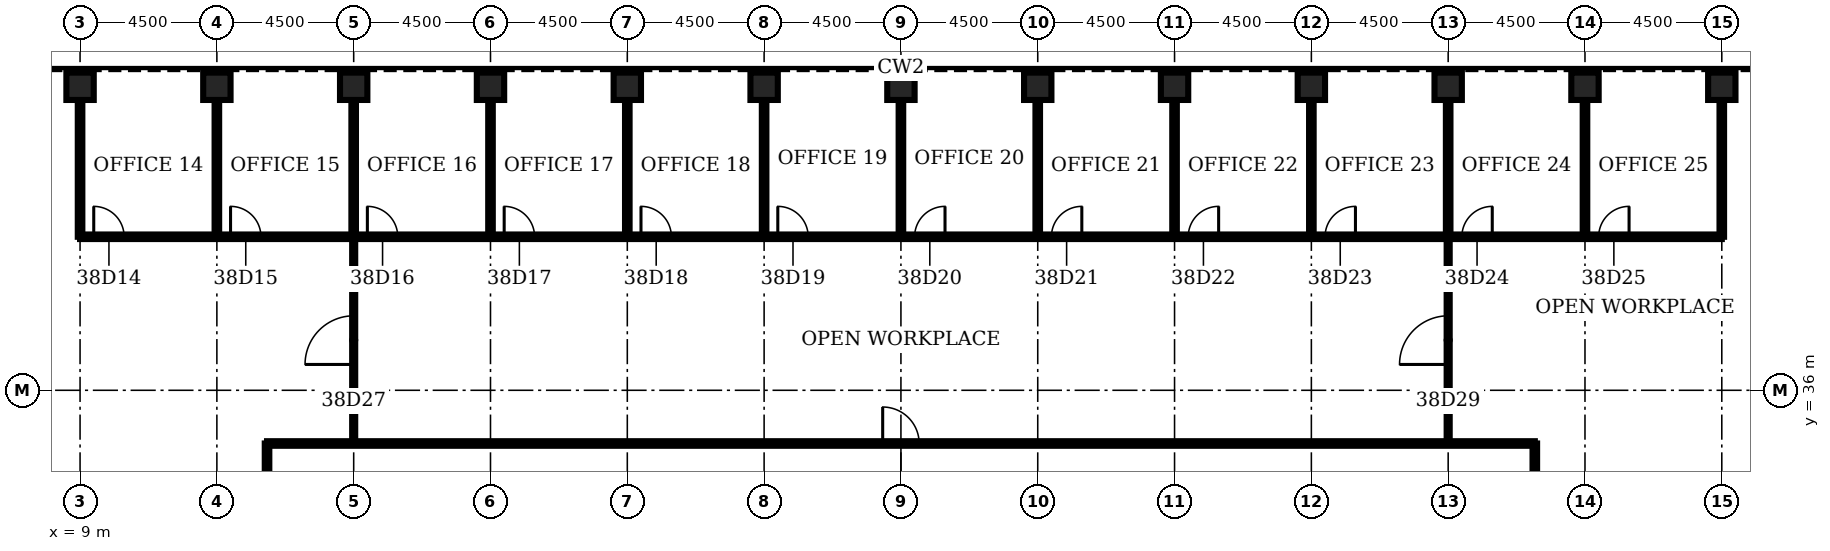
"""IFC4 building model, lengths in metres.
Left out: names, types, materials, properties, quantities, classifications, styles, units other than length and angle.
Written with IfcOpenShell. Run it as: python <this file> out.ifc"""

import sys

from ifc_helpers import new_model, si_unit, direction, frame, frame_2d, origin, origin_2d, place, context, subcontext, project, spatial, rectangle, hollow_rectangle, extrude, element, fill, save


model = new_model("IFC4")
c1 = context("Model", 3, precision=1e-05, world=origin(), true_north=direction((0.0, 1.0)))
c2 = subcontext(c1, "Body", "Model", "MODEL_VIEW")
j1 = project(units=[si_unit("LENGTHUNIT", "METRE"), si_unit("PLANEANGLEUNIT", "RADIAN")], contexts=[c1])
p1 = place(None, origin())
s1 = spatial("IfcSite", under=j1, at=p1, CompositionType="ELEMENT")
p2 = place(p1, origin())
s2 = spatial("IfcBuilding", under=s1, at=p2, CompositionType="ELEMENT")
p3 = place(p2, frame((0.0, 0.0, 171.9)))
s3 = spatial("IfcBuildingStorey", under=s2, at=p3, CompositionType="ELEMENT", Elevation=171.9)
for number, where, z_axis, x_axis in (
    (1, (63.0, 46.0, 0.0), (0.0, 0.0, 1.0), (0.0, 1.0, 0.0)),
    (2, (58.5, 46.0, 0.0), (0.0, 0.0, 1.0), (0.0, 1.0, 0.0)),
    (3, (54.0, 46.0, 0.0), (0.0, 0.0, 1.0), (0.0, 1.0, 0.0)),
    (4, (49.5, 46.0, 0.0), (0.0, 0.0, 1.0), (0.0, 1.0, 0.0)),
    (5, (45.0, 46.0, 0.0), (0.0, 0.0, 1.0), (0.0, 1.0, 0.0)),
    (6, (40.5, 46.0, 0.0), (0.0, 0.0, 1.0), (0.0, 1.0, 0.0)),
    (7, (36.0, 46.0, 0.0), (0.0, 0.0, 1.0), (0.0, 1.0, 0.0)),
    (8, (31.5, 46.0, 0.0), (0.0, 0.0, 1.0), (0.0, 1.0, 0.0)),
    (9, (27.0, 46.0, 0.0), (0.0, 0.0, 1.0), (0.0, 1.0, 0.0)),
    (10, (22.5, 46.0, 0.0), (0.0, 0.0, 1.0), (0.0, 1.0, 0.0)),
    (11, (18.0, 46.0, 0.0), (0.0, 0.0, 1.0), (0.0, 1.0, 0.0)),
    (12, (13.5, 46.0, 0.0), (0.0, 0.0, 1.0), (0.0, 1.0, 0.0)),
    (13, (9.0, 46.0, 0.0), (0.0, 0.0, 1.0), (0.0, 1.0, 0.0)),
):
    element("IfcColumn", number, at=place(p3, frame(where, z_axis=z_axis, x_axis=x_axis)), inside=s3, PredefinedType="COLUMN", context=c2, shape_type="SweptSolid", body=[
        extrude(hollow_rectangle(XDim=0.9, YDim=0.9, WallThickness=0.09, at=origin_2d()), origin(), (0.0, 0.0, 1.0), 4.2),
    ])
p4 = place(p3, frame((15.15, 34.25, 0.0), z_axis=(0.0, 0.0, 1.0), x_axis=(1.0, 0.0, 0.0)))
e14 = element("IfcWall", 14, at=p4, inside=s3, PredefinedType="PARTITIONING", context=c2, shape_type="SweptSolid", body=[
    extrude(rectangle(XDim=41.7, YDim=0.15, at=frame_2d((20.85, 0.0))), origin(), (0.0, 0.0, 1.0), 3.0),
])
p5 = place(p4, frame((20.25, 0.0, 0.0)))
e15 = element("IfcOpeningElement", 15, at=p5, cuts=e14, PredefinedType="OPENING", context=c2, shape_type="SweptSolid", body=[
    extrude(rectangle(XDim=1.2, YDim=2.1, at=frame_2d((0.6, 1.05))), frame((0.0, 0.085, 0.0), z_axis=(0.0, -1.0, 0.0), x_axis=(1.0, 0.0, 0.0)), (0.0, 0.0, 1.0), 0.17),
])
p6 = place(p3, frame((9.0, 41.05, 0.0), z_axis=(0.0, 0.0, 1.0), x_axis=(1.0, 0.0, 0.0)))
e16 = element("IfcWall", 16, at=p6, inside=s3, PredefinedType="PARTITIONING", context=c2, shape_type="SweptSolid", body=[
    extrude(rectangle(XDim=54.0, YDim=0.15, at=frame_2d((27.0, 0.0))), origin(), (0.0, 0.0, 1.0), 3.0),
])
p7 = place(p6, frame((0.45, 0.0, 0.0)))
e17 = element("IfcOpeningElement", 17, at=p7, cuts=e16, PredefinedType="OPENING", context=c2, shape_type="SweptSolid", body=[
    extrude(rectangle(XDim=1.0, YDim=2.1, at=frame_2d((0.5, 1.05))), frame((0.0, 0.085, 0.0), z_axis=(0.0, -1.0, 0.0), x_axis=(1.0, 0.0, 0.0)), (0.0, 0.0, 1.0), 0.17),
])
p8 = place(p6, frame((4.95, 0.0, 0.0)))
e18 = element("IfcOpeningElement", 18, at=p8, cuts=e16, PredefinedType="OPENING", context=c2, shape_type="SweptSolid", body=[
    extrude(rectangle(XDim=1.0, YDim=2.1, at=frame_2d((0.5, 1.05))), frame((0.0, 0.085, 0.0), z_axis=(0.0, -1.0, 0.0), x_axis=(1.0, 0.0, 0.0)), (0.0, 0.0, 1.0), 0.17),
])
p9 = place(p6, frame((9.45, 0.0, 0.0)))
e19 = element("IfcOpeningElement", 19, at=p9, cuts=e16, PredefinedType="OPENING", context=c2, shape_type="SweptSolid", body=[
    extrude(rectangle(XDim=1.0, YDim=2.1, at=frame_2d((0.5, 1.05))), frame((0.0, 0.085, 0.0), z_axis=(0.0, -1.0, 0.0), x_axis=(1.0, 0.0, 0.0)), (0.0, 0.0, 1.0), 0.17),
])
p10 = place(p6, frame((13.95, 0.0, 0.0)))
e20 = element("IfcOpeningElement", 20, at=p10, cuts=e16, PredefinedType="OPENING", context=c2, shape_type="SweptSolid", body=[
    extrude(rectangle(XDim=1.0, YDim=2.1, at=frame_2d((0.5, 1.05))), frame((0.0, 0.085, 0.0), z_axis=(0.0, -1.0, 0.0), x_axis=(1.0, 0.0, 0.0)), (0.0, 0.0, 1.0), 0.17),
])
p11 = place(p6, frame((18.45, 0.0, 0.0)))
e21 = element("IfcOpeningElement", 21, at=p11, cuts=e16, PredefinedType="OPENING", context=c2, shape_type="SweptSolid", body=[
    extrude(rectangle(XDim=1.0, YDim=2.1, at=frame_2d((0.5, 1.05))), frame((0.0, 0.085, 0.0), z_axis=(0.0, -1.0, 0.0), x_axis=(1.0, 0.0, 0.0)), (0.0, 0.0, 1.0), 0.17),
])
p12 = place(p6, frame((22.95, 0.0, 0.0)))
e22 = element("IfcOpeningElement", 22, at=p12, cuts=e16, PredefinedType="OPENING", context=c2, shape_type="SweptSolid", body=[
    extrude(rectangle(XDim=1.0, YDim=2.1, at=frame_2d((0.5, 1.05))), frame((0.0, 0.085, 0.0), z_axis=(0.0, -1.0, 0.0), x_axis=(1.0, 0.0, 0.0)), (0.0, 0.0, 1.0), 0.17),
])
p13 = place(p6, frame((27.45, 0.0, 0.0)))
e23 = element("IfcOpeningElement", 23, at=p13, cuts=e16, PredefinedType="OPENING", context=c2, shape_type="SweptSolid", body=[
    extrude(rectangle(XDim=1.0, YDim=2.1, at=frame_2d((0.5, 1.05))), frame((0.0, 0.085, 0.0), z_axis=(0.0, -1.0, 0.0), x_axis=(1.0, 0.0, 0.0)), (0.0, 0.0, 1.0), 0.17),
])
p14 = place(p6, frame((31.95, 0.0, 0.0)))
e24 = element("IfcOpeningElement", 24, at=p14, cuts=e16, PredefinedType="OPENING", context=c2, shape_type="SweptSolid", body=[
    extrude(rectangle(XDim=1.0, YDim=2.1, at=frame_2d((0.5, 1.05))), frame((0.0, 0.085, 0.0), z_axis=(0.0, -1.0, 0.0), x_axis=(1.0, 0.0, 0.0)), (0.0, 0.0, 1.0), 0.17),
])
p15 = place(p6, frame((36.45, 0.0, 0.0)))
e25 = element("IfcOpeningElement", 25, at=p15, cuts=e16, PredefinedType="OPENING", context=c2, shape_type="SweptSolid", body=[
    extrude(rectangle(XDim=1.0, YDim=2.1, at=frame_2d((0.5, 1.05))), frame((0.0, 0.085, 0.0), z_axis=(0.0, -1.0, 0.0), x_axis=(1.0, 0.0, 0.0)), (0.0, 0.0, 1.0), 0.17),
])
p16 = place(p6, frame((40.95, 0.0, 0.0)))
e26 = element("IfcOpeningElement", 26, at=p16, cuts=e16, PredefinedType="OPENING", context=c2, shape_type="SweptSolid", body=[
    extrude(rectangle(XDim=1.0, YDim=2.1, at=frame_2d((0.5, 1.05))), frame((0.0, 0.085, 0.0), z_axis=(0.0, -1.0, 0.0), x_axis=(1.0, 0.0, 0.0)), (0.0, 0.0, 1.0), 0.17),
])
p17 = place(p6, frame((45.45, 0.0, 0.0)))
e27 = element("IfcOpeningElement", 27, at=p17, cuts=e16, PredefinedType="OPENING", context=c2, shape_type="SweptSolid", body=[
    extrude(rectangle(XDim=1.0, YDim=2.1, at=frame_2d((0.5, 1.05))), frame((0.0, 0.085, 0.0), z_axis=(0.0, -1.0, 0.0), x_axis=(1.0, 0.0, 0.0)), (0.0, 0.0, 1.0), 0.17),
])
p18 = place(p6, frame((49.95, 0.0, 0.0)))
e28 = element("IfcOpeningElement", 28, at=p18, cuts=e16, PredefinedType="OPENING", context=c2, shape_type="SweptSolid", body=[
    extrude(rectangle(XDim=1.0, YDim=2.1, at=frame_2d((0.5, 1.05))), frame((0.0, 0.085, 0.0), z_axis=(0.0, -1.0, 0.0), x_axis=(1.0, 0.0, 0.0)), (0.0, 0.0, 1.0), 0.17),
])
for number, where, z_axis, x_axis in (
    (29, (9.0, 41.05, 0.0), (0.0, 0.0, 1.0), (0.0, 1.0, 0.0)),
    (30, (13.5, 41.05, 0.0), (0.0, 0.0, 1.0), (0.0, 1.0, 0.0)),
):
    element("IfcWall", number, at=place(p3, frame(where, z_axis=z_axis, x_axis=x_axis)), inside=s3, PredefinedType="PARTITIONING", context=c2, shape_type="SweptSolid", body=[
        extrude(rectangle(XDim=4.5, YDim=0.15, at=frame_2d((2.25, 0.0))), origin(), (0.0, 0.0, 1.0), 3.0),
    ])
p19 = place(p3, frame((15.15, 13.75, 0.0), z_axis=(0.0, 0.0, 1.0), x_axis=(0.0, 1.0, 0.0)))
e31 = element("IfcWall", 31, at=p19, inside=s3, PredefinedType="PARTITIONING", context=c2, shape_type="SweptSolid", body=[
    extrude(rectangle(XDim=20.5, YDim=0.15, at=frame_2d((10.25, 0.0))), origin(), (0.0, 0.0, 1.0), 3.0),
])
p20 = place(p19, frame((9.65, 0.0, 0.0)))
e32 = element("IfcOpeningElement", 32, at=p20, cuts=e31, PredefinedType="OPENING", context=c2, shape_type="SweptSolid", body=[
    extrude(rectangle(XDim=1.2, YDim=2.1, at=frame_2d((0.6, 1.05))), frame((0.0, 0.085, 0.0), z_axis=(0.0, -1.0, 0.0), x_axis=(1.0, 0.0, 0.0)), (0.0, 0.0, 1.0), 0.17),
])
p21 = place(p3, frame((18.0, 34.25, 0.0), z_axis=(0.0, 0.0, 1.0), x_axis=(0.0, 1.0, 0.0)))
e33 = element("IfcWall", 33, at=p21, inside=s3, PredefinedType="PARTITIONING", context=c2, shape_type="SweptSolid", body=[
    extrude(rectangle(XDim=6.8, YDim=0.1, at=frame_2d((3.4, 0.0))), origin(), (0.0, 0.0, 1.0), 3.0),
])
p22 = place(p21, frame((2.6, 0.0, 0.0)))
e34 = element("IfcOpeningElement", 34, at=p22, cuts=e33, PredefinedType="OPENING", context=c2, shape_type="SweptSolid", body=[
    extrude(rectangle(XDim=1.6, YDim=2.1, at=frame_2d((0.8, 1.05))), frame((0.0, 0.06, 0.0), z_axis=(0.0, -1.0, 0.0), x_axis=(1.0, 0.0, 0.0)), (0.0, 0.0, 1.0), 0.12),
])
for number, where, z_axis, x_axis in (
    (35, (18.0, 41.05, 0.0), (0.0, 0.0, 1.0), (0.0, 1.0, 0.0)),
    (36, (22.5, 41.05, 0.0), (0.0, 0.0, 1.0), (0.0, 1.0, 0.0)),
    (37, (27.0, 41.05, 0.0), (0.0, 0.0, 1.0), (0.0, 1.0, 0.0)),
    (38, (31.5, 41.05, 0.0), (0.0, 0.0, 1.0), (0.0, 1.0, 0.0)),
    (39, (36.0, 41.05, 0.0), (0.0, 0.0, 1.0), (0.0, 1.0, 0.0)),
    (40, (40.5, 41.05, 0.0), (0.0, 0.0, 1.0), (0.0, 1.0, 0.0)),
    (41, (45.0, 41.05, 0.0), (0.0, 0.0, 1.0), (0.0, 1.0, 0.0)),
    (42, (49.5, 41.05, 0.0), (0.0, 0.0, 1.0), (0.0, 1.0, 0.0)),
):
    element("IfcWall", number, at=place(p3, frame(where, z_axis=z_axis, x_axis=x_axis)), inside=s3, PredefinedType="PARTITIONING", context=c2, shape_type="SweptSolid", body=[
        extrude(rectangle(XDim=4.5, YDim=0.15, at=frame_2d((2.25, 0.0))), origin(), (0.0, 0.0, 1.0), 3.0),
    ])
p23 = place(p3, frame((54.0, 34.25, 0.0), z_axis=(0.0, 0.0, 1.0), x_axis=(0.0, 1.0, 0.0)))
e43 = element("IfcWall", 43, at=p23, inside=s3, PredefinedType="PARTITIONING", context=c2, shape_type="SweptSolid", body=[
    extrude(rectangle(XDim=6.8, YDim=0.1, at=frame_2d((3.4, 0.0))), origin(), (0.0, 0.0, 1.0), 3.0),
])
p24 = place(p23, frame((2.6, 0.0, 0.0)))
e44 = element("IfcOpeningElement", 44, at=p24, cuts=e43, PredefinedType="OPENING", context=c2, shape_type="SweptSolid", body=[
    extrude(rectangle(XDim=1.6, YDim=2.1, at=frame_2d((0.8, 1.05))), frame((0.0, 0.06, 0.0), z_axis=(0.0, -1.0, 0.0), x_axis=(1.0, 0.0, 0.0)), (0.0, 0.0, 1.0), 0.12),
])
p25 = place(p3, frame((54.0, 41.05, 0.0), z_axis=(0.0, 0.0, 1.0), x_axis=(0.0, 1.0, 0.0)))
e45 = element("IfcWall", 45, at=p25, inside=s3, PredefinedType="PARTITIONING", context=c2, shape_type="SweptSolid", body=[
    extrude(rectangle(XDim=4.5, YDim=0.15, at=frame_2d((2.25, 0.0))), origin(), (0.0, 0.0, 1.0), 3.0),
])
p26 = place(p3, frame((56.85, 13.75, 0.0), z_axis=(0.0, 0.0, 1.0), x_axis=(0.0, 1.0, 0.0)))
e46 = element("IfcWall", 46, at=p26, inside=s3, PredefinedType="PARTITIONING", context=c2, shape_type="SweptSolid", body=[
    extrude(rectangle(XDim=20.5, YDim=0.15, at=frame_2d((10.25, 0.0))), origin(), (0.0, 0.0, 1.0), 3.0),
])
p27 = place(p26, frame((9.65, 0.0, 0.0)))
e47 = element("IfcOpeningElement", 47, at=p27, cuts=e46, PredefinedType="OPENING", context=c2, shape_type="SweptSolid", body=[
    extrude(rectangle(XDim=1.2, YDim=2.1, at=frame_2d((0.6, 1.05))), frame((0.0, 0.085, 0.0), z_axis=(0.0, -1.0, 0.0), x_axis=(1.0, 0.0, 0.0)), (0.0, 0.0, 1.0), 0.17),
])
for number, where, z_axis, x_axis in (
    (48, (58.5, 41.05, 0.0), (0.0, 0.0, 1.0), (0.0, 1.0, 0.0)),
    (49, (63.0, 41.05, 0.0), (0.0, 0.0, 1.0), (0.0, 1.0, 0.0)),
):
    element("IfcWall", number, at=place(p3, frame(where, z_axis=z_axis, x_axis=x_axis)), inside=s3, PredefinedType="PARTITIONING", context=c2, shape_type="SweptSolid", body=[
        extrude(rectangle(XDim=4.5, YDim=0.15, at=frame_2d((2.25, 0.0))), origin(), (0.0, 0.0, 1.0), 3.0),
    ])
p28 = place(p7, origin())
e50 = element("IfcDoor", 50, at=p28, inside=s3, OperationType="SINGLE_SWING_LEFT", PredefinedType="DOOR", context=c2, shape_type="SweptSolid", body=[
    extrude(rectangle(XDim=1.0, YDim=2.1, at=frame_2d((0.5, 1.05))), frame((0.0, 0.025, 0.0), z_axis=(0.0, -1.0, 0.0), x_axis=(1.0, 0.0, 0.0)), (0.0, 0.0, 1.0), 0.05),
])
fill(e17, e50)
p29 = place(p8, origin())
e51 = element("IfcDoor", 51, at=p29, inside=s3, OperationType="SINGLE_SWING_LEFT", PredefinedType="DOOR", context=c2, shape_type="SweptSolid", body=[
    extrude(rectangle(XDim=1.0, YDim=2.1, at=frame_2d((0.5, 1.05))), frame((0.0, 0.025, 0.0), z_axis=(0.0, -1.0, 0.0), x_axis=(1.0, 0.0, 0.0)), (0.0, 0.0, 1.0), 0.05),
])
fill(e18, e51)
p30 = place(p9, origin())
e52 = element("IfcDoor", 52, at=p30, inside=s3, OperationType="SINGLE_SWING_LEFT", PredefinedType="DOOR", context=c2, shape_type="SweptSolid", body=[
    extrude(rectangle(XDim=1.0, YDim=2.1, at=frame_2d((0.5, 1.05))), frame((0.0, 0.025, 0.0), z_axis=(0.0, -1.0, 0.0), x_axis=(1.0, 0.0, 0.0)), (0.0, 0.0, 1.0), 0.05),
])
fill(e19, e52)
p31 = place(p10, origin())
e53 = element("IfcDoor", 53, at=p31, inside=s3, OperationType="SINGLE_SWING_LEFT", PredefinedType="DOOR", context=c2, shape_type="SweptSolid", body=[
    extrude(rectangle(XDim=1.0, YDim=2.1, at=frame_2d((0.5, 1.05))), frame((0.0, 0.025, 0.0), z_axis=(0.0, -1.0, 0.0), x_axis=(1.0, 0.0, 0.0)), (0.0, 0.0, 1.0), 0.05),
])
fill(e20, e53)
p32 = place(p11, origin())
e54 = element("IfcDoor", 54, at=p32, inside=s3, OperationType="SINGLE_SWING_LEFT", PredefinedType="DOOR", context=c2, shape_type="SweptSolid", body=[
    extrude(rectangle(XDim=1.0, YDim=2.1, at=frame_2d((0.5, 1.05))), frame((0.0, 0.025, 0.0), z_axis=(0.0, -1.0, 0.0), x_axis=(1.0, 0.0, 0.0)), (0.0, 0.0, 1.0), 0.05),
])
fill(e21, e54)
p33 = place(p12, origin())
e55 = element("IfcDoor", 55, at=p33, inside=s3, OperationType="SINGLE_SWING_LEFT", PredefinedType="DOOR", context=c2, shape_type="SweptSolid", body=[
    extrude(rectangle(XDim=1.0, YDim=2.1, at=frame_2d((0.5, 1.05))), frame((0.0, 0.025, 0.0), z_axis=(0.0, -1.0, 0.0), x_axis=(1.0, 0.0, 0.0)), (0.0, 0.0, 1.0), 0.05),
])
fill(e22, e55)
p34 = place(p13, origin())
e56 = element("IfcDoor", 56, at=p34, inside=s3, OperationType="SINGLE_SWING_RIGHT", PredefinedType="DOOR", context=c2, shape_type="SweptSolid", body=[
    extrude(rectangle(XDim=1.0, YDim=2.1, at=frame_2d((0.5, 1.05))), frame((0.0, 0.025, 0.0), z_axis=(0.0, -1.0, 0.0), x_axis=(1.0, 0.0, 0.0)), (0.0, 0.0, 1.0), 0.05),
])
fill(e23, e56)
p35 = place(p14, origin())
e57 = element("IfcDoor", 57, at=p35, inside=s3, OperationType="SINGLE_SWING_RIGHT", PredefinedType="DOOR", context=c2, shape_type="SweptSolid", body=[
    extrude(rectangle(XDim=1.0, YDim=2.1, at=frame_2d((0.5, 1.05))), frame((0.0, 0.025, 0.0), z_axis=(0.0, -1.0, 0.0), x_axis=(1.0, 0.0, 0.0)), (0.0, 0.0, 1.0), 0.05),
])
fill(e24, e57)
p36 = place(p15, origin())
e58 = element("IfcDoor", 58, at=p36, inside=s3, OperationType="SINGLE_SWING_RIGHT", PredefinedType="DOOR", context=c2, shape_type="SweptSolid", body=[
    extrude(rectangle(XDim=1.0, YDim=2.1, at=frame_2d((0.5, 1.05))), frame((0.0, 0.025, 0.0), z_axis=(0.0, -1.0, 0.0), x_axis=(1.0, 0.0, 0.0)), (0.0, 0.0, 1.0), 0.05),
])
fill(e25, e58)
p37 = place(p16, origin())
e59 = element("IfcDoor", 59, at=p37, inside=s3, OperationType="SINGLE_SWING_RIGHT", PredefinedType="DOOR", context=c2, shape_type="SweptSolid", body=[
    extrude(rectangle(XDim=1.0, YDim=2.1, at=frame_2d((0.5, 1.05))), frame((0.0, 0.025, 0.0), z_axis=(0.0, -1.0, 0.0), x_axis=(1.0, 0.0, 0.0)), (0.0, 0.0, 1.0), 0.05),
])
fill(e26, e59)
p38 = place(p17, origin())
e60 = element("IfcDoor", 60, at=p38, inside=s3, OperationType="SINGLE_SWING_RIGHT", PredefinedType="DOOR", context=c2, shape_type="SweptSolid", body=[
    extrude(rectangle(XDim=1.0, YDim=2.1, at=frame_2d((0.5, 1.05))), frame((0.0, 0.025, 0.0), z_axis=(0.0, -1.0, 0.0), x_axis=(1.0, 0.0, 0.0)), (0.0, 0.0, 1.0), 0.05),
])
fill(e27, e60)
p39 = place(p18, origin())
e61 = element("IfcDoor", 61, at=p39, inside=s3, OperationType="SINGLE_SWING_RIGHT", PredefinedType="DOOR", context=c2, shape_type="SweptSolid", body=[
    extrude(rectangle(XDim=1.0, YDim=2.1, at=frame_2d((0.5, 1.05))), frame((0.0, 0.025, 0.0), z_axis=(0.0, -1.0, 0.0), x_axis=(1.0, 0.0, 0.0)), (0.0, 0.0, 1.0), 0.05),
])
fill(e28, e61)
p40 = place(p22, origin())
e62 = element("IfcDoor", 62, at=p40, inside=s3, OperationType="SINGLE_SWING_LEFT", PredefinedType="DOOR", context=c2, shape_type="SweptSolid", body=[
    extrude(rectangle(XDim=1.6, YDim=2.1, at=frame_2d((0.8, 1.05))), frame((0.0, 0.025, 0.0), z_axis=(0.0, -1.0, 0.0), x_axis=(1.0, 0.0, 0.0)), (0.0, 0.0, 1.0), 0.05),
])
fill(e34, e62)
p41 = place(p24, origin())
e63 = element("IfcDoor", 63, at=p41, inside=s3, OperationType="SINGLE_SWING_LEFT", PredefinedType="DOOR", context=c2, shape_type="SweptSolid", body=[
    extrude(rectangle(XDim=1.6, YDim=2.1, at=frame_2d((0.8, 1.05))), frame((0.0, 0.025, 0.0), z_axis=(0.0, -1.0, 0.0), x_axis=(1.0, 0.0, 0.0)), (0.0, 0.0, 1.0), 0.05),
])
fill(e44, e63)
p42 = place(p5, origin())
e64 = element("IfcDoor", 64, at=p42, inside=s3, OperationType="SINGLE_SWING_LEFT", PredefinedType="DOOR", context=c2, shape_type="SweptSolid", body=[
    extrude(rectangle(XDim=1.2, YDim=2.1, at=frame_2d((0.6, 1.05))), frame((0.0, 0.025, 0.0), z_axis=(0.0, -1.0, 0.0), x_axis=(1.0, 0.0, 0.0)), (0.0, 0.0, 1.0), 0.05),
])
fill(e15, e64)
save(model, sys.argv[1])
